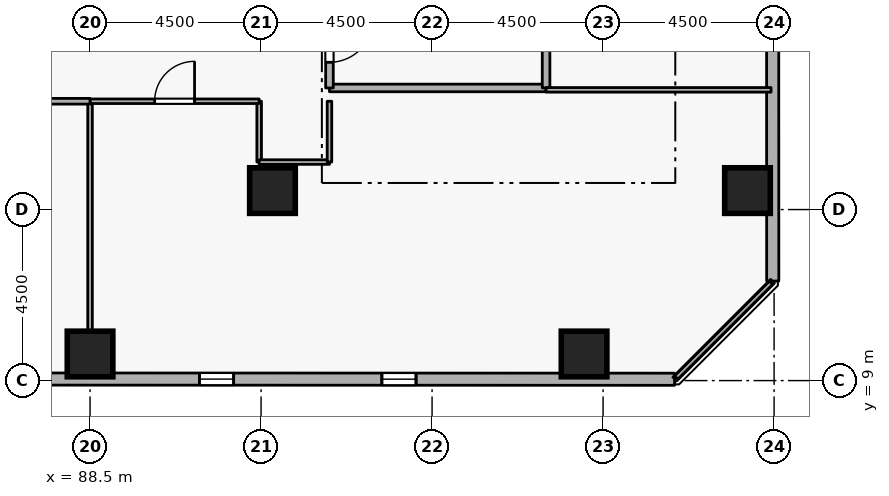
"""IFC4 building model, lengths in metres.
Left out: names, types, materials, properties, quantities, classifications, styles, units other than length and angle.
Written with IfcOpenShell. Run it as: python <this file> out.ifc"""

import sys

from ifc_helpers import new_model, si_unit, direction, frame, frame_2d, origin, origin_2d, place, context, subcontext, project, spatial, rectangle, extrude, element, fill, save


model = new_model("IFC4")
c1 = context("Model", 3, precision=1e-05, world=origin(), true_north=direction((0.0, 1.0)))
c2 = subcontext(c1, "Body", "Model", "MODEL_VIEW")
j1 = project(units=[si_unit("LENGTHUNIT", "METRE"), si_unit("PLANEANGLEUNIT", "RADIAN")], contexts=[c1])
p1 = place(None, origin())
s1 = spatial("IfcSite", under=j1, at=p1, CompositionType="ELEMENT")
p2 = place(p1, origin())
s2 = spatial("IfcBuilding", under=s1, at=p2, CompositionType="ELEMENT")
p3 = place(p2, frame((0.0, 0.0, 80.1)))
s3 = spatial("IfcBuildingStorey", under=s2, at=p3, CompositionType="ELEMENT", Elevation=80.1)
for number, where, z_axis, x_axis in (
    (1, (105.8, 14.0, 0.0), (0.0, 0.0, 1.0), (1.0, 0.0, 0.0)),
    (2, (101.5, 9.7, 0.0), (0.0, 0.0, 1.0), (1.0, 0.0, 0.0)),
    (3, (88.5, 9.7, 0.0), (0.0, 0.0, 1.0), (1.0, 0.0, 0.0)),
    (4, (93.3, 14.0, 0.0), (0.0, 0.0, 1.0), (1.0, 0.0, 0.0)),
):
    element("IfcColumn", number, at=place(p3, frame(where, z_axis=z_axis, x_axis=x_axis)), inside=s3, PredefinedType="COLUMN", context=c2, shape_type="SweptSolid", body=[
        extrude(rectangle(XDim=1.2, YDim=1.2, at=origin_2d()), origin(), (0.0, 0.0, 1.0), 3.6),
    ])
p4 = place(p3, frame((70.378, 9.046, 0.0), z_axis=(0.0, 0.0, 1.0), x_axis=(0.999999950907, -0.000313347115, 0.0)))
e5 = element("IfcWall", 5, at=p4, inside=s3, PredefinedType="STANDARD", context=c2, shape_type="SweptSolid", body=[
    extrude(rectangle(XDim=33.503, YDim=0.32, at=frame_2d((16.751, 0.0))), origin(), (0.0, 0.0, 1.0), 2.7),
])
p5 = place(p4, frame((6.6, 0.0, 0.72)))
e6 = element("IfcOpeningElement", 6, at=p5, cuts=e5, PredefinedType="OPENING", context=c2, shape_type="SweptSolid", body=[
    extrude(rectangle(XDim=0.9, YDim=1.75, at=frame_2d((0.45, 0.875))), frame((0.0, 0.17, 0.0), z_axis=(0.0, -1.0, 0.0), x_axis=(1.0, 0.0, 0.0)), (0.0, 0.0, 1.0), 0.34),
])
p6 = place(p4, frame((11.4, 0.0, 0.72)))
e7 = element("IfcOpeningElement", 7, at=p6, cuts=e5, PredefinedType="OPENING", context=c2, shape_type="SweptSolid", body=[
    extrude(rectangle(XDim=0.9, YDim=1.75, at=frame_2d((0.45, 0.875))), frame((0.0, 0.17, 0.0), z_axis=(0.0, -1.0, 0.0), x_axis=(1.0, 0.0, 0.0)), (0.0, 0.0, 1.0), 0.34),
])
p7 = place(p4, frame((21.0, 0.0, 0.72)))
e8 = element("IfcOpeningElement", 8, at=p7, cuts=e5, PredefinedType="OPENING", context=c2, shape_type="SweptSolid", body=[
    extrude(rectangle(XDim=0.9, YDim=1.75, at=frame_2d((0.45, 0.875))), frame((0.0, 0.17, 0.0), z_axis=(0.0, -1.0, 0.0), x_axis=(1.0, 0.0, 0.0)), (0.0, 0.0, 1.0), 0.34),
])
p8 = place(p4, frame((25.8, 0.0, 0.72)))
e9 = element("IfcOpeningElement", 9, at=p8, cuts=e5, PredefinedType="OPENING", context=c2, shape_type="SweptSolid", body=[
    extrude(rectangle(XDim=0.9, YDim=1.75, at=frame_2d((0.45, 0.875))), frame((0.0, 0.17, 0.0), z_axis=(0.0, -1.0, 0.0), x_axis=(1.0, 0.0, 0.0)), (0.0, 0.0, 1.0), 0.34),
])
p9 = place(p3, frame((106.465, 11.619, 0.0), z_axis=(0.0, 0.0, 1.0), x_axis=(-0.000313347115, 0.999999950907, 0.0)))
e10 = element("IfcWall", 10, at=p9, inside=s3, PredefinedType="STANDARD", context=c2, shape_type="SweptSolid", body=[
    extrude(rectangle(XDim=33.503, YDim=0.32, at=frame_2d((16.751, 0.0))), origin(), (0.0, 0.0, 1.0), 2.7),
])
p10 = place(p9, frame((6.6, 0.0, 0.72)))
e11 = element("IfcOpeningElement", 11, at=p10, cuts=e10, PredefinedType="OPENING", context=c2, shape_type="SweptSolid", body=[
    extrude(rectangle(XDim=0.9, YDim=1.75, at=frame_2d((0.45, 0.875))), frame((0.0, 0.17, 0.0), z_axis=(0.0, -1.0, 0.0), x_axis=(1.0, 0.0, 0.0)), (0.0, 0.0, 1.0), 0.34),
])
p11 = place(p9, frame((11.4, 0.0, 0.72)))
e12 = element("IfcOpeningElement", 12, at=p11, cuts=e10, PredefinedType="OPENING", context=c2, shape_type="SweptSolid", body=[
    extrude(rectangle(XDim=0.9, YDim=1.75, at=frame_2d((0.45, 0.875))), frame((0.0, 0.17, 0.0), z_axis=(0.0, -1.0, 0.0), x_axis=(1.0, 0.0, 0.0)), (0.0, 0.0, 1.0), 0.34),
])
p12 = place(p9, frame((21.0, 0.0, 0.72)))
e13 = element("IfcOpeningElement", 13, at=p12, cuts=e10, PredefinedType="OPENING", context=c2, shape_type="SweptSolid", body=[
    extrude(rectangle(XDim=0.9, YDim=1.75, at=frame_2d((0.45, 0.875))), frame((0.0, 0.17, 0.0), z_axis=(0.0, -1.0, 0.0), x_axis=(1.0, 0.0, 0.0)), (0.0, 0.0, 1.0), 0.34),
])
p13 = place(p9, frame((25.8, 0.0, 0.72)))
e14 = element("IfcOpeningElement", 14, at=p13, cuts=e10, PredefinedType="OPENING", context=c2, shape_type="SweptSolid", body=[
    extrude(rectangle(XDim=0.9, YDim=1.75, at=frame_2d((0.45, 0.875))), frame((0.0, 0.17, 0.0), z_axis=(0.0, -1.0, 0.0), x_axis=(1.0, 0.0, 0.0)), (0.0, 0.0, 1.0), 0.34),
])
p14 = place(p9, frame((30.6, 0.0, 0.72)))
e15 = element("IfcOpeningElement", 15, at=p14, cuts=e10, PredefinedType="OPENING", context=c2, shape_type="SweptSolid", body=[
    extrude(rectangle(XDim=0.9, YDim=1.75, at=frame_2d((0.45, 0.875))), frame((0.0, 0.17, 0.0), z_axis=(0.0, -1.0, 0.0), x_axis=(1.0, 0.0, 0.0)), (0.0, 0.0, 1.0), 0.34),
])
p15 = place(p3, frame((94.8, 16.7, 0.0), z_axis=(0.0, 0.0, 1.0), x_axis=(1.0, 0.0, 0.0)))
e16 = element("IfcWall", 16, at=p15, inside=s3, PredefinedType="STANDARD", context=c2, shape_type="SweptSolid", body=[
    extrude(rectangle(XDim=5.7, YDim=0.2, at=frame_2d((2.85, 0.0))), origin(), (0.0, 0.0, 1.0), 3.34),
])
p16 = place(p3, frame((100.5, 16.7, 0.0), z_axis=(0.0, 0.0, 1.0), x_axis=(0.0, 1.0, 0.0)))
e17 = element("IfcWall", 17, at=p16, inside=s3, PredefinedType="STANDARD", context=c2, shape_type="SweptSolid", body=[
    extrude(rectangle(XDim=2.5, YDim=0.2, at=frame_2d((1.25, 0.0))), origin(), (0.0, 0.0, 1.0), 3.34),
])
p17 = place(p3, frame((94.8, 19.2, 0.0), z_axis=(0.0, 0.0, 1.0), x_axis=(0.0, -1.0, 0.0)))
e18 = element("IfcWall", 18, at=p17, inside=s3, PredefinedType="STANDARD", context=c2, shape_type="SweptSolid", body=[
    extrude(rectangle(XDim=2.5, YDim=0.2, at=frame_2d((1.25, 0.0))), origin(), (0.0, 0.0, 1.0), 3.34),
])
p18 = place(p17, frame((0.675, 0.0, 0.0)))
e19 = element("IfcOpeningElement", 19, at=p18, cuts=e18, PredefinedType="OPENING", context=c2, shape_type="SweptSolid", body=[
    extrude(rectangle(XDim=1.15, YDim=2.1, at=frame_2d((0.575, 1.05))), frame((0.0, 0.11, 0.0), z_axis=(0.0, -1.0, 0.0), x_axis=(1.0, 0.0, 0.0)), (0.0, 0.0, 1.0), 0.22),
])
p19 = place(p3, frame((92.95, 16.35, 0.0), z_axis=(0.0, 0.0, 1.0), x_axis=(0.0, -1.0, 0.0)))
e20 = element("IfcWall", 20, at=p19, inside=s3, PredefinedType="PARTITIONING", context=c2, shape_type="SweptSolid", body=[
    extrude(rectangle(XDim=1.6, YDim=0.12, at=frame_2d((0.8, 0.0))), origin(), (0.0, 0.0, 1.0), 3.34),
])
p20 = place(p3, frame((92.95, 14.75, 0.0), z_axis=(0.0, 0.0, 1.0), x_axis=(1.0, 0.0, 0.0)))
e21 = element("IfcWall", 21, at=p20, inside=s3, PredefinedType="PARTITIONING", context=c2, shape_type="SweptSolid", body=[
    extrude(rectangle(XDim=1.85, YDim=0.12, at=frame_2d((0.925, 0.0))), origin(), (0.0, 0.0, 1.0), 3.34),
])
p21 = place(p3, frame((94.8, 14.75, 0.0), z_axis=(0.0, 0.0, 1.0), x_axis=(0.0, 1.0, 0.0)))
e22 = element("IfcWall", 22, at=p21, inside=s3, PredefinedType="PARTITIONING", context=c2, shape_type="SweptSolid", body=[
    extrude(rectangle(XDim=1.6, YDim=0.12, at=frame_2d((0.8, 0.0))), origin(), (0.0, 0.0, 1.0), 3.34),
])
p22 = place(p3, frame((100.5, 16.65, 0.0), z_axis=(0.0, 0.0, 1.0), x_axis=(1.0, 0.0, 0.0)))
e23 = element("IfcWall", 23, at=p22, inside=s3, PredefinedType="PARTITIONING", context=c2, shape_type="SweptSolid", body=[
    extrude(rectangle(XDim=5.92, YDim=0.12, at=frame_2d((2.96, 0.0))), origin(), (0.0, 0.0, 1.0), 3.34),
])
p23 = place(p3, frame((106.42, 11.575, 0.0), z_axis=(0.0, 0.0, 1.0), x_axis=(-0.707106781187, -0.707106781187, 0.0)))
e24 = element("IfcWall", 24, at=p23, inside=s3, PredefinedType="PARTITIONING", context=c2, shape_type="SweptSolid", body=[
    extrude(rectangle(XDim=3.528, YDim=0.12, at=frame_2d((1.764, 0.0))), origin(), (0.0, 0.0, 1.0), 3.34),
])
p24 = place(p3, frame((88.5, 9.08, 0.0), z_axis=(0.0, 0.0, 1.0), x_axis=(0.0, 1.0, 0.0)))
e25 = element("IfcWall", 25, at=p24, inside=s3, PredefinedType="PARTITIONING", context=c2, shape_type="SweptSolid", body=[
    extrude(rectangle(XDim=7.27, YDim=0.12, at=frame_2d((3.635, 0.0))), origin(), (0.0, 0.0, 1.0), 2.882),
])
p25 = place(p3, frame((88.5, 16.35, 0.0), z_axis=(0.0, 0.0, 1.0), x_axis=(1.0, 0.0, 0.0)))
e26 = element("IfcWall", 26, at=p25, inside=s3, PredefinedType="PARTITIONING", context=c2, shape_type="SweptSolid", body=[
    extrude(rectangle(XDim=4.45, YDim=0.12, at=frame_2d((2.225, 0.0))), origin(), (0.0, 0.0, 1.0), 3.34),
])
p26 = place(p25, frame((1.7, 0.0, 0.0)))
e27 = element("IfcOpeningElement", 27, at=p26, cuts=e26, PredefinedType="OPENING", context=c2, shape_type="SweptSolid", body=[
    extrude(rectangle(XDim=1.05, YDim=2.1, at=frame_2d((0.525, 1.05))), frame((0.0, 0.07, 0.0), z_axis=(0.0, -1.0, 0.0), x_axis=(1.0, 0.0, 0.0)), (0.0, 0.0, 1.0), 0.14),
])
p27 = place(p3, frame((84.05, 16.35, 0.0), z_axis=(0.0, 0.0, 1.0), x_axis=(1.0, 0.0, 0.0)))
e28 = element("IfcWall", 28, at=p27, inside=s3, PredefinedType="PARTITIONING", context=c2, shape_type="SweptSolid", body=[
    extrude(rectangle(XDim=4.45, YDim=0.15, at=frame_2d((2.225, 0.0))), origin(), (0.0, 0.0, 1.0), 3.34),
])
p28 = place(p27, frame((1.575, 0.0, 0.0)))
e29 = element("IfcOpeningElement", 29, at=p28, cuts=e28, PredefinedType="OPENING", context=c2, shape_type="SweptSolid", body=[
    extrude(rectangle(XDim=1.3, YDim=2.12, at=frame_2d((0.65, 1.06))), frame((0.0, 0.085, 0.0), z_axis=(0.0, -1.0, 0.0), x_axis=(1.0, 0.0, 0.0)), (0.0, 0.0, 1.0), 0.17),
])
p29 = place(p7, origin())
e30 = element("IfcWindow", 30, at=p29, inside=s3, PartitioningType="SINGLE_PANEL", PredefinedType="WINDOW", context=c2, shape_type="SweptSolid", body=[
    extrude(rectangle(XDim=0.9, YDim=1.75, at=frame_2d((0.45, 0.875))), frame((0.0, 0.03, 0.0), z_axis=(0.0, -1.0, 0.0), x_axis=(1.0, 0.0, 0.0)), (0.0, 0.0, 1.0), 0.06),
])
fill(e8, e30)
p30 = place(p8, origin())
e31 = element("IfcWindow", 31, at=p30, inside=s3, PartitioningType="SINGLE_PANEL", PredefinedType="WINDOW", context=c2, shape_type="SweptSolid", body=[
    extrude(rectangle(XDim=0.9, YDim=1.75, at=frame_2d((0.45, 0.875))), frame((0.0, 0.03, 0.0), z_axis=(0.0, -1.0, 0.0), x_axis=(1.0, 0.0, 0.0)), (0.0, 0.0, 1.0), 0.06),
])
fill(e9, e31)
p31 = place(p18, origin())
e32 = element("IfcDoor", 32, at=p31, inside=s3, OperationType="SINGLE_SWING_LEFT", PredefinedType="DOOR", context=c2, shape_type="SweptSolid", body=[
    extrude(rectangle(XDim=1.15, YDim=2.1, at=frame_2d((0.575, 1.05))), frame((0.0, 0.025, 0.0), z_axis=(0.0, -1.0, 0.0), x_axis=(1.0, 0.0, 0.0)), (0.0, 0.0, 1.0), 0.05),
])
fill(e19, e32)
p32 = place(p26, origin())
e33 = element("IfcDoor", 33, at=p32, inside=s3, OperationType="SINGLE_SWING_RIGHT", PredefinedType="DOOR", context=c2, shape_type="SweptSolid", body=[
    extrude(rectangle(XDim=1.05, YDim=2.1, at=frame_2d((0.525, 1.05))), frame((0.0, 0.025, 0.0), z_axis=(0.0, -1.0, 0.0), x_axis=(1.0, 0.0, 0.0)), (0.0, 0.0, 1.0), 0.05),
])
fill(e27, e33)
save(model, sys.argv[1])
